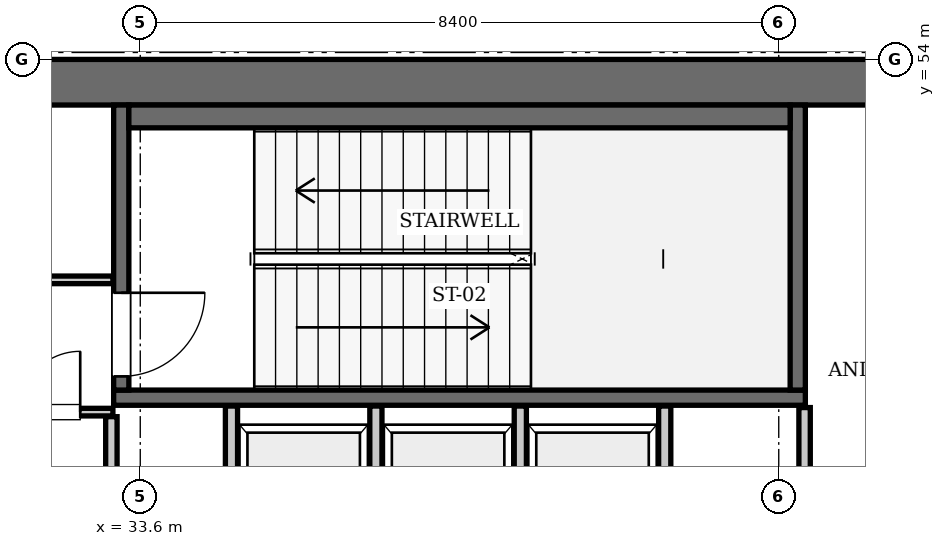
"""IFC4 building model, lengths in metres.
Left out: names, types, materials, properties, quantities, classifications, styles, units other than length and angle.
Written with IfcOpenShell. Run it as: python <this file> out.ifc"""

import sys

from ifc_helpers import new_model, si_unit, direction, frame, frame_2d, origin, place, context, subcontext, project, spatial, rectangle, extrude, element, fill, save


model = new_model("IFC4")
c1 = context("Model", 3, precision=1e-05, world=origin(), true_north=direction((0.0, 1.0)))
c2 = subcontext(c1, "Body", "Model", "MODEL_VIEW")
j1 = project(units=[si_unit("LENGTHUNIT", "METRE"), si_unit("PLANEANGLEUNIT", "RADIAN")], contexts=[c1])
p1 = place(None, origin())
s1 = spatial("IfcSite", under=j1, at=p1, CompositionType="ELEMENT")
p2 = place(p1, origin())
s2 = spatial("IfcBuilding", under=s1, at=p2, CompositionType="ELEMENT")
p3 = place(p2, frame((0.0, 0.0, 354.2)))
s3 = spatial("IfcBuildingStorey", under=s2, at=p3, CompositionType="ELEMENT", Elevation=354.2)
p4 = place(p3, frame((25.2, 53.7, 0.0), z_axis=(0.0, 0.0, 1.0), x_axis=(1.0, 0.0, 0.0)))
e1 = element("IfcWall", 1, at=p4, inside=s3, PredefinedType="SHEAR", context=c2, shape_type="SweptSolid", body=[
    extrude(rectangle(XDim=25.2, YDim=0.6, at=frame_2d((12.6, 0.0))), origin(), (0.0, 0.0, 1.0), 4.9),
])
p5 = place(p3, frame((33.25, 49.55, 0.0), z_axis=(0.0, 0.0, 1.0), x_axis=(1.0, 0.0, 0.0)))
e2 = element("IfcWall", 2, at=p5, inside=s3, PredefinedType="SOLIDWALL", context=c2, shape_type="SweptSolid", body=[
    extrude(rectangle(XDim=9.1, YDim=0.2, at=frame_2d((4.55, 0.0))), origin(), (0.0, 0.0, 1.0), 4.64),
])
p6 = place(p3, frame((42.25, 49.65, 0.0), z_axis=(0.0, 0.0, 1.0), x_axis=(0.0, 1.0, 0.0)))
e3 = element("IfcWall", 3, at=p6, inside=s3, PredefinedType="SOLIDWALL", context=c2, shape_type="SweptSolid", body=[
    extrude(rectangle(XDim=3.75, YDim=0.2, at=frame_2d((1.875, 0.0))), origin(), (0.0, 0.0, 1.0), 4.64),
])
p7 = place(p3, frame((33.35, 49.65, 0.0), z_axis=(0.0, 0.0, 1.0), x_axis=(0.0, 1.0, 0.0)))
e4 = element("IfcWall", 4, at=p7, inside=s3, PredefinedType="SOLIDWALL", context=c2, shape_type="SweptSolid", body=[
    extrude(rectangle(XDim=3.75, YDim=0.2, at=frame_2d((1.875, 0.0))), origin(), (0.0, 0.0, 1.0), 4.64),
])
p8 = place(p7, frame((0.18, 0.0, 0.0)))
e5 = element("IfcOpeningElement", 5, at=p8, cuts=e4, PredefinedType="OPENING", context=c2, shape_type="SweptSolid", body=[
    extrude(rectangle(XDim=1.1, YDim=2.15, at=frame_2d((0.55, 1.075))), frame((0.0, 0.11, 0.0), z_axis=(0.0, -1.0, 0.0), x_axis=(1.0, 0.0, 0.0)), (0.0, 0.0, 1.0), 0.22),
])
p9 = place(p3, frame((33.45, 53.25, 0.0), z_axis=(0.0, 0.0, 1.0), x_axis=(1.0, 0.0, 0.0)))
e6 = element("IfcWall", 6, at=p9, inside=s3, PredefinedType="SOLIDWALL", context=c2, shape_type="SweptSolid", body=[
    extrude(rectangle(XDim=8.7, YDim=0.3, at=frame_2d((4.35, 0.0))), origin(), (0.0, 0.0, 1.0), 4.64),
])
for number, where, z_axis, x_axis in (
    (7, (34.8, 47.25, 0.0), (0.0, 0.0, 1.0), (0.0, 1.0, 0.0)),
    (8, (36.7, 47.25, 0.0), (0.0, 0.0, 1.0), (0.0, 1.0, 0.0)),
    (9, (38.6, 47.25, 0.0), (0.0, 0.0, 1.0), (0.0, 1.0, 0.0)),
    (10, (40.5, 47.25, 0.0), (0.0, 0.0, 1.0), (0.0, 1.0, 0.0)),
):
    element("IfcWall", number, at=place(p3, frame(where, z_axis=z_axis, x_axis=x_axis)), inside=s3, PredefinedType="SOLIDWALL", context=c2, shape_type="SweptSolid", body=[
        extrude(rectangle(XDim=2.19, YDim=0.16, at=frame_2d((1.095, 0.0))), origin(), (0.0, 0.0, 1.0), 4.64),
    ])
p10 = place(p3, frame((33.22, 45.14, 0.0), z_axis=(0.0, 0.0, 1.0), x_axis=(0.0, 1.0, 0.0)))
e11 = element("IfcWall", 11, at=p10, inside=s3, PredefinedType="PARTITIONING", context=c2, shape_type="SweptSolid", body=[
    extrude(rectangle(XDim=4.16, YDim=0.15, at=frame_2d((2.08, 0.0))), origin(), (0.0, 0.0, 1.0), 4.64),
])
p11 = place(p3, frame((30.06, 49.36, 0.0), z_axis=(0.0, 0.0, 1.0), x_axis=(1.0, 0.0, 0.0)))
e12 = element("IfcWall", 12, at=p11, inside=s3, PredefinedType="PARTITIONING", context=c2, shape_type="SweptSolid", body=[
    extrude(rectangle(XDim=3.18, YDim=0.1, at=frame_2d((1.59, 0.0))), origin(), (0.0, 0.0, 1.0), 4.64),
])
p12 = place(p11, frame((1.95, 0.0, 0.0)))
e13 = element("IfcOpeningElement", 13, at=p12, cuts=e12, PredefinedType="OPENING", context=c2, shape_type="SweptSolid", body=[
    extrude(rectangle(XDim=0.8, YDim=2.05, at=frame_2d((0.4, 1.025))), frame((0.0, 0.06, 0.0), z_axis=(0.0, -1.0, 0.0), x_axis=(1.0, 0.0, 0.0)), (0.0, 0.0, 1.0), 0.12),
])
p13 = place(p3, frame((31.82, 51.1, 0.0), z_axis=(0.0, 0.0, 1.0), x_axis=(1.0, 0.0, 0.0)))
e14 = element("IfcWall", 14, at=p13, inside=s3, PredefinedType="PARTITIONING", context=c2, shape_type="SweptSolid", body=[
    extrude(rectangle(XDim=1.42, YDim=0.1, at=frame_2d((0.71, 0.0))), origin(), (0.0, 0.0, 1.0), 4.64),
])
p14 = place(p3, frame((42.34, 47.36, 0.0), z_axis=(0.0, 0.0, 1.0), x_axis=(0.0, 1.0, 0.0)))
e15 = element("IfcWall", 15, at=p14, inside=s3, PredefinedType="PARTITIONING", context=c2, shape_type="SweptSolid", body=[
    extrude(rectangle(XDim=2.06, YDim=0.15, at=frame_2d((1.03, 0.0))), origin(), (0.0, 0.0, 1.0), 4.64),
])
p15 = place(p14, frame((0.24, 0.0, 0.0)))
e16 = element("IfcOpeningElement", 16, at=p15, cuts=e15, PredefinedType="OPENING", context=c2, shape_type="SweptSolid", body=[
    extrude(rectangle(XDim=0.8, YDim=2.05, at=frame_2d((0.4, 1.025))), frame((0.0, 0.085, 0.0), z_axis=(0.0, -1.0, 0.0), x_axis=(1.0, 0.0, 0.0)), (0.0, 0.0, 1.0), 0.17),
])
p16 = place(p8, frame((1.1, 0.0, 0.0), z_axis=(0.0, 0.0, 1.0), x_axis=(-1.0, 0.0, 0.0)))
e17 = element("IfcDoor", 17, at=p16, inside=s3, OperationType="SINGLE_SWING_LEFT", PredefinedType="DOOR", context=c2, shape_type="SweptSolid", body=[
    extrude(rectangle(XDim=1.1, YDim=2.15, at=frame_2d((0.55, 1.075))), frame((0.0, 0.025, 0.0), z_axis=(0.0, -1.0, 0.0), x_axis=(1.0, 0.0, 0.0)), (0.0, 0.0, 1.0), 0.05),
])
fill(e5, e17)
p17 = place(p12, origin())
e18 = element("IfcDoor", 18, at=p17, inside=s3, OperationType="SINGLE_SWING_RIGHT", PredefinedType="DOOR", context=c2, shape_type="SweptSolid", body=[
    extrude(rectangle(XDim=0.8, YDim=2.05, at=frame_2d((0.4, 1.025))), frame((0.0, 0.025, 0.0), z_axis=(0.0, -1.0, 0.0), x_axis=(1.0, 0.0, 0.0)), (0.0, 0.0, 1.0), 0.05),
])
fill(e13, e18)
save(model, sys.argv[1])
